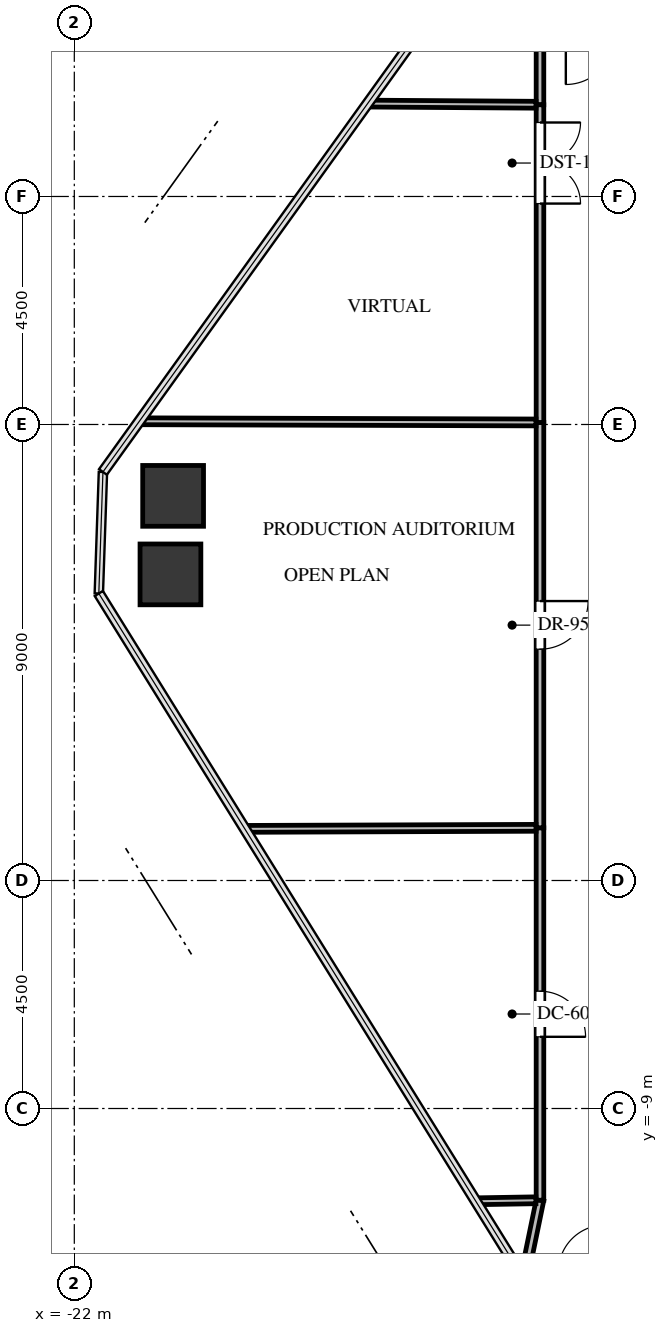
"""IFC4 building model, lengths in metres.
Left out: names, types, materials, properties, quantities, classifications, styles, units other than length and angle.
Written with IfcOpenShell. Run it as: python <this file> out.ifc"""

import sys

from ifc_helpers import new_model, si_unit, direction, frame, frame_2d, origin, origin_2d, place, context, subcontext, project, spatial, rectangle, extrude, source, transform, mapped, element, fill, save


model = new_model("IFC4")
c1 = context("Model", 3, precision=1e-05, world=origin(), true_north=direction((0.0, 1.0)))
c2 = subcontext(c1, "Body", "Model", "MODEL_VIEW")
j1 = project(units=[si_unit("LENGTHUNIT", "METRE"), si_unit("PLANEANGLEUNIT", "RADIAN")], contexts=[c1])
p1 = place(None, origin())
s1 = spatial("IfcSite", under=j1, at=p1, CompositionType="ELEMENT")
p2 = place(p1, origin())
s2 = spatial("IfcBuilding", under=s1, at=p2, CompositionType="ELEMENT")
p3 = place(p2, frame((0.0, 0.0, 133.8)))
s3 = spatial("IfcBuildingStorey", under=s2, at=p3, CompositionType="ELEMENT", Elevation=133.8)
m1 = source(origin(), c2, "Body", "SweptSolid", [
    extrude(rectangle(XDim=1.2, YDim=1.2, at=origin_2d()), origin(), (0.0, 0.0, 1.0), 3.3),
])
for number, where, z_axis, x_axis in (
    (1, (-20.103, 1.542, -0.24), (0.0, 0.0, 1.0), (1.0, 0.0, 0.0)),
    (2, (-20.05, 3.091, -0.24), (0.0, 0.0, 1.0), (1.0, 0.0, 0.0)),
):
    element("IfcColumn", number, at=place(p3, frame(where, z_axis=z_axis, x_axis=x_axis)), inside=s3, PredefinedType="COLUMN", context=c2, shape_type="MappedRepresentation", body=[
        mapped(m1, transform((0.0, 0.0, 0.0), x_axis=(1.0, 0.0, 0.0), y_axis=(0.0, 1.0, 0.0), z_axis=(0.0, 0.0, 1.0), scale=1.0)),
    ])
p4 = place(p3, frame((-12.81, 12.081, 0.0), z_axis=(0.0, 0.0, 1.0), x_axis=(0.0, -1.0, 0.0)))
e3 = element("IfcWall", 3, at=p4, inside=s3, PredefinedType="PARTITIONING", context=c2, shape_type="SweptSolid", body=[
    extrude(rectangle(XDim=1.271, YDim=0.15, at=frame_2d((0.635, 0.0))), origin(), (0.0, 0.0, 1.0), 3.045),
])
p5 = place(p3, frame((-12.81, -10.81, 0.0), z_axis=(0.0, 0.0, 1.0), x_axis=(-0.201786289638, -0.979429575474, 0.0)))
e4 = element("IfcWall", 4, at=p5, inside=s3, PredefinedType="PARTITIONING", context=c2, shape_type="SweptSolid", body=[
    extrude(rectangle(XDim=1.498, YDim=0.15, at=frame_2d((0.749, 0.0))), origin(), (0.0, 0.0, 1.0), 3.045),
])
p6 = place(p3, frame((-12.81, -3.46, 0.0), z_axis=(0.0, 0.0, 1.0), x_axis=(0.0, -1.0, 0.0)))
e5 = element("IfcWall", 5, at=p6, inside=s3, PredefinedType="PARTITIONING", context=c2, shape_type="SweptSolid", body=[
    extrude(rectangle(XDim=7.35, YDim=0.15, at=frame_2d((3.675, 0.0))), origin(), (0.0, 0.0, 1.0), 2.38),
])
p7 = place(p6, frame((3.225, 0.0, 0.0)))
e6 = element("IfcOpeningElement", 6, at=p7, cuts=e5, PredefinedType="OPENING", context=c2, shape_type="SweptSolid", body=[
    extrude(rectangle(XDim=0.9, YDim=2.05, at=frame_2d((0.45, 1.025))), frame((0.0, 0.085, 0.0), z_axis=(0.0, -1.0, 0.0), x_axis=(1.0, 0.0, 0.0)), (0.0, 0.0, 1.0), 0.17),
])
p8 = place(p3, frame((-12.81, 4.54, 0.0), z_axis=(0.0, 0.0, 1.0), x_axis=(0.0, -1.0, 0.0)))
e7 = element("IfcWall", 7, at=p8, inside=s3, PredefinedType="PARTITIONING", context=c2, shape_type="SweptSolid", body=[
    extrude(rectangle(XDim=8.0, YDim=0.15, at=frame_2d((4.0, 0.0))), origin(), (0.0, 0.0, 1.0), 2.212),
])
p9 = place(p8, frame((3.525, 0.0, 0.0)))
e8 = element("IfcOpeningElement", 8, at=p9, cuts=e7, PredefinedType="OPENING", context=c2, shape_type="SweptSolid", body=[
    extrude(rectangle(XDim=0.95, YDim=2.1, at=frame_2d((0.475, 1.05))), frame((0.0, 0.085, 0.0), z_axis=(0.0, -1.0, 0.0), x_axis=(1.0, 0.0, 0.0)), (0.0, 0.0, 1.0), 0.17),
])
p10 = place(p3, frame((-12.81, 10.81, 0.0), z_axis=(0.0, 0.0, 1.0), x_axis=(0.0, -1.0, 0.0)))
e9 = element("IfcWall", 9, at=p10, inside=s3, PredefinedType="PARTITIONING", context=c2, shape_type="SweptSolid", body=[
    extrude(rectangle(XDim=6.27, YDim=0.15, at=frame_2d((3.135, 0.0))), origin(), (0.0, 0.0, 1.0), 3.045),
])
p11 = place(p10, frame((0.35, 0.0, 0.0)))
e10 = element("IfcOpeningElement", 10, at=p11, cuts=e9, PredefinedType="OPENING", context=c2, shape_type="SweptSolid", body=[
    extrude(rectangle(XDim=1.6, YDim=2.15, at=frame_2d((0.8, 1.075))), frame((0.0, 0.085, 0.0), z_axis=(0.0, -1.0, 0.0), x_axis=(1.0, 0.0, 0.0)), (0.0, 0.0, 1.0), 0.17),
])
p12 = place(p3, frame((-12.889, 10.811, 0.0), z_axis=(0.0, 0.0, 1.0), x_axis=(-0.999976657862, 0.006832549348, 0.0)))
e11 = element("IfcWall", 11, at=p12, inside=s3, PredefinedType="PARTITIONING", context=c2, shape_type="SweptSolid", body=[
    extrude(rectangle(XDim=3.323, YDim=0.135, at=frame_2d((1.662, 0.0))), origin(), (0.0, 0.0, 1.0), 2.38),
])
p13 = place(p3, frame((-14.076, -10.831, 0.0), z_axis=(0.0, 0.0, 1.0), x_axis=(0.999860796611, 0.016684945308, 0.0)))
e12 = element("IfcWall", 12, at=p13, inside=s3, PredefinedType="PARTITIONING", context=c2, shape_type="SweptSolid", body=[
    extrude(rectangle(XDim=1.185, YDim=0.135, at=frame_2d((0.593, 0.0))), origin(), (0.0, 0.0, 1.0), 3.045),
])
p14 = place(p3, frame((-18.635, -3.481, 0.0), z_axis=(0.0, 0.0, 1.0), x_axis=(0.999993324293, 0.003653952494, 0.0)))
e13 = element("IfcWall", 13, at=p14, inside=s3, PredefinedType="PARTITIONING", context=c2, shape_type="SweptSolid", body=[
    extrude(rectangle(XDim=5.746, YDim=0.135, at=frame_2d((2.873, 0.0))), origin(), (0.0, 0.0, 1.0), 2.38),
])
p15 = place(p3, frame((-20.716, 4.563, 0.0), z_axis=(0.0, 0.0, 1.0), x_axis=(0.999995701977, -0.002931898443, 0.0)))
e14 = element("IfcWall", 14, at=p15, inside=s3, PredefinedType="PARTITIONING", context=c2, shape_type="SweptSolid", body=[
    extrude(rectangle(XDim=7.827, YDim=0.135, at=frame_2d((3.914, 0.0))), origin(), (0.0, 0.0, 1.0), 2.38),
])
m2 = source(origin(), c2, "Body", "SweptSolid", [
    extrude(rectangle(XDim=0.9, YDim=2.05, at=frame_2d((0.45, 1.025))), frame((0.0, 0.025, 0.0), z_axis=(0.0, -1.0, 0.0), x_axis=(1.0, 0.0, 0.0)), (0.0, 0.0, 1.0), 0.05),
])
p16 = place(p7, origin())
e15 = element("IfcDoor", 15, at=p16, inside=s3, OperationType="SINGLE_SWING_RIGHT", PredefinedType="DOOR", context=c2, shape_type="MappedRepresentation", body=[
    mapped(m2, transform((0.0, 0.0, 0.0), x_axis=(1.0, 0.0, 0.0), y_axis=(0.0, 1.0, 0.0), z_axis=(0.0, 0.0, 1.0), scale=1.0)),
])
fill(e6, e15)
m3 = source(origin(), c2, "Body", "SweptSolid", [
    extrude(rectangle(XDim=0.95, YDim=2.1, at=frame_2d((0.475, 1.05))), frame((0.0, 0.025, 0.0), z_axis=(0.0, -1.0, 0.0), x_axis=(1.0, 0.0, 0.0)), (0.0, 0.0, 1.0), 0.05),
])
p17 = place(p9, origin())
e16 = element("IfcDoor", 16, at=p17, inside=s3, OperationType="SINGLE_SWING_LEFT", PredefinedType="DOOR", context=c2, shape_type="MappedRepresentation", body=[
    mapped(m3, transform((0.0, 0.0, 0.0), x_axis=(1.0, 0.0, 0.0), y_axis=(0.0, 1.0, 0.0), z_axis=(0.0, 0.0, 1.0), scale=1.0)),
])
fill(e8, e16)
m4 = source(origin(), c2, "Body", "SweptSolid", [
    extrude(rectangle(XDim=1.6, YDim=2.15, at=frame_2d((0.8, 1.075))), frame((0.0, 0.025, 0.0), z_axis=(0.0, -1.0, 0.0), x_axis=(1.0, 0.0, 0.0)), (0.0, 0.0, 1.0), 0.05),
])
p18 = place(p11, origin())
e17 = element("IfcDoor", 17, at=p18, inside=s3, OperationType="DOUBLE_DOOR_SINGLE_SWING", PredefinedType="DOOR", context=c2, shape_type="MappedRepresentation", body=[
    mapped(m4, transform((0.0, 0.0, 0.0), x_axis=(1.0, 0.0, 0.0), y_axis=(0.0, 1.0, 0.0), z_axis=(0.0, 0.0, 1.0), scale=1.0)),
])
fill(e10, e17)
save(model, sys.argv[1])
